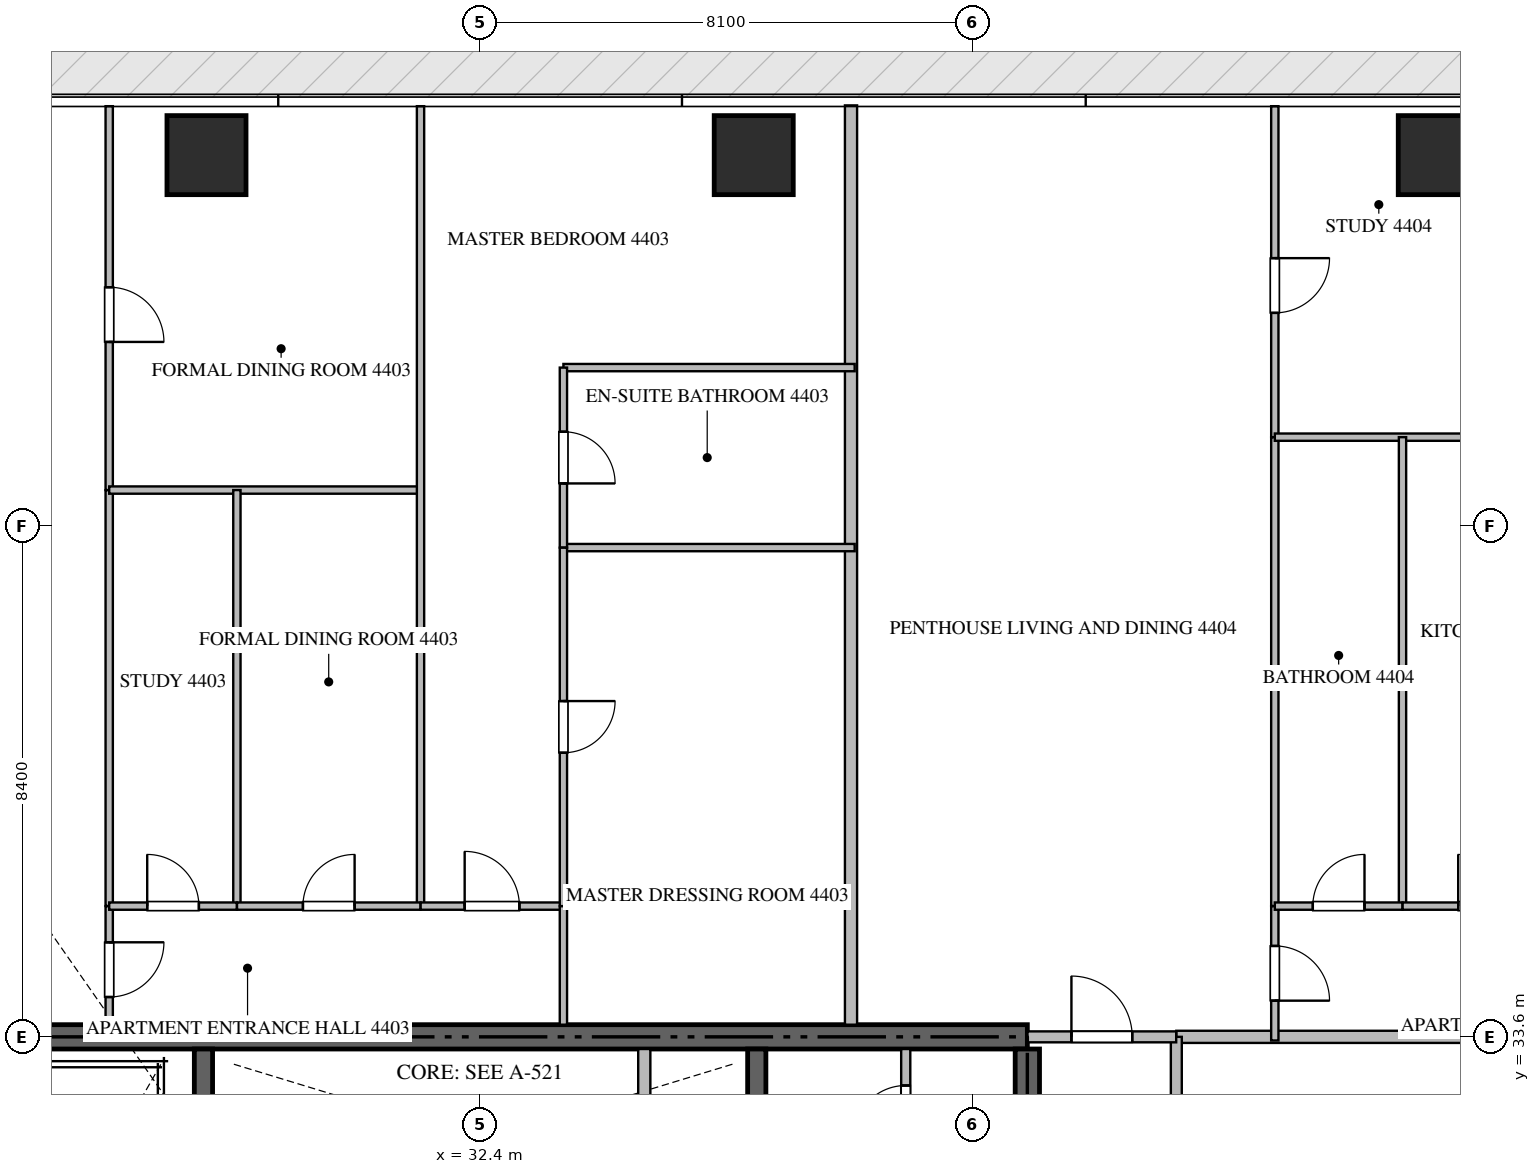
"""IFC4 building model, lengths in metres.
Left out: names, types, materials, properties, quantities, classifications, styles, units other than length and angle.
Written with IfcOpenShell. Run it as: python <this file> out.ifc"""

import sys

from ifc_helpers import new_model, si_unit, direction, frame, frame_2d, origin, origin_2d, place, context, subcontext, project, spatial, rectangle, extrude, source, transform, mapped, element, fill, save


model = new_model("IFC4")
c1 = context("Model", 3, precision=1e-05, world=origin(), true_north=direction((0.0, 1.0)))
c2 = subcontext(c1, "Body", "Model", "MODEL_VIEW")
j1 = project(units=[si_unit("LENGTHUNIT", "METRE"), si_unit("PLANEANGLEUNIT", "RADIAN")], contexts=[c1])
p1 = place(None, origin())
s1 = spatial("IfcSite", under=j1, at=p1, CompositionType="ELEMENT")
p2 = place(p1, origin())
s2 = spatial("IfcBuilding", under=s1, at=p2, CompositionType="ELEMENT")
p3 = place(p2, frame((0.0, 0.0, 176.4)))
s3 = spatial("IfcBuildingStorey", under=s2, at=p3, CompositionType="ELEMENT", Elevation=176.4)
p4 = place(p3, frame((41.4, 33.6, -0.26), z_axis=(0.0, 0.0, 1.0), x_axis=(-1.0, 0.0, 0.0)))
e1 = element("IfcWall", 1, at=p4, inside=s3, PredefinedType="SHEAR", context=c2, shape_type="SweptSolid", body=[
    extrude(rectangle(XDim=18.0, YDim=0.4, at=frame_2d((9.0, 0.0))), origin(), (0.0, 0.0, 1.0), 3.748),
])
p5 = place(p3, frame((41.4, 27.75, -0.26), z_axis=(0.0, 0.0, 1.0), x_axis=(0.0, 1.0, 0.0)))
e2 = element("IfcWall", 2, at=p5, inside=s3, PredefinedType="SHEAR", context=c2, shape_type="SweptSolid", body=[
    extrude(rectangle(XDim=5.65, YDim=0.4, at=frame_2d((2.825, 0.0))), origin(), (0.0, 0.0, 1.0), 3.748),
])
p6 = place(p3, frame((27.85, 23.55, -0.26), z_axis=(0.0, 0.0, 1.0), x_axis=(0.0, 1.0, 0.0)))
e3 = element("IfcWall", 3, at=p6, inside=s3, PredefinedType="SHEAR", context=c2, shape_type="SweptSolid", body=[
    extrude(rectangle(XDim=9.85, YDim=0.3, at=frame_2d((4.925, 0.0))), origin(), (0.0, 0.0, 1.0), 3.748),
])
p7 = place(p3, frame((36.95, 27.05, -0.26), z_axis=(0.0, 0.0, 1.0), x_axis=(0.0, 1.0, 0.0)))
e4 = element("IfcWall", 4, at=p7, inside=s3, PredefinedType="SHEAR", context=c2, shape_type="SweptSolid", body=[
    extrude(rectangle(XDim=6.35, YDim=0.3, at=frame_2d((3.175, 0.0))), origin(), (0.0, 0.0, 1.0), 3.748),
])
m1 = source(origin(), c2, "Body", "SweptSolid", [
    extrude(rectangle(XDim=1.3, YDim=1.3, at=origin_2d()), origin(), (0.0, 0.0, 1.0), 3.75),
])
for number, where, z_axis, x_axis in (
    (5, (27.9, 48.1, -0.26), (0.0, 0.0, 1.0), (1.0, 0.0, 0.0)),
    (6, (36.9, 48.1, -0.26), (0.0, 0.0, 1.0), (1.0, 0.0, 0.0)),
    (7, (48.15, 48.1, -0.26), (0.0, 0.0, 1.0), (1.0, 0.0, 0.0)),
):
    element("IfcColumn", number, at=place(p3, frame(where, z_axis=z_axis, x_axis=x_axis)), inside=s3, PredefinedType="COLUMN", context=c2, shape_type="MappedRepresentation", body=[
        mapped(m1, transform((0.0, 0.0, 0.0), scale=1.0)),
    ])
p8 = place(p3, frame((35.1, 30.75, 0.0), z_axis=(0.0, 0.0, 1.0), x_axis=(0.0, 1.0, 0.0)))
e8 = element("IfcWall", 8, at=p8, inside=s3, PredefinedType="STANDARD", context=c2, shape_type="SweptSolid", body=[
    extrude(rectangle(XDim=2.65, YDim=0.2, at=frame_2d((1.325, 0.0))), origin(), (0.0, 0.0, 1.0), 3.49),
])
p9 = place(p3, frame((39.4, 31.35, 0.0), z_axis=(0.0, 0.0, 1.0), x_axis=(0.0, 1.0, 0.0)))
e9 = element("IfcWall", 9, at=p9, inside=s3, PredefinedType="PARTITIONING", context=c2, shape_type="SweptSolid", body=[
    extrude(rectangle(XDim=2.05, YDim=0.15, at=frame_2d((1.025, 0.0))), origin(), (0.0, 0.0, 1.0), 3.49),
])
p10 = place(p9, frame((0.6, 0.0, 0.0)))
e10 = element("IfcOpeningElement", 10, at=p10, cuts=e9, PredefinedType="OPENING", context=c2, shape_type="SweptSolid", body=[
    extrude(rectangle(XDim=0.85, YDim=2.1, at=frame_2d((0.425, 1.05))), frame((0.0, 0.085, 0.0), z_axis=(0.0, -1.0, 0.0), x_axis=(1.0, 0.0, 0.0)), (0.0, 0.0, 1.0), 0.17),
])
p11 = place(p3, frame((38.5, 33.8, 0.0), z_axis=(0.0, 0.0, 1.0), x_axis=(0.0, 1.0, 0.0)))
e11 = element("IfcWall", 11, at=p11, inside=s3, PredefinedType="PARTITIONING", context=c2, shape_type="SweptSolid", body=[
    extrude(rectangle(XDim=15.118, YDim=0.2, at=frame_2d((7.559, 0.0))), origin(), (0.0, 0.0, 1.0), 3.49),
])
p12 = place(p3, frame((43.85, 33.6, 0.0), z_axis=(0.0, 0.0, 1.0), x_axis=(1.0, 0.0, 0.0)))
e12 = element("IfcWall", 12, at=p12, inside=s3, PredefinedType="PARTITIONING", context=c2, shape_type="SweptSolid", body=[
    extrude(rectangle(XDim=13.068, YDim=0.2, at=frame_2d((6.534, 0.0))), origin(), (0.0, 0.0, 1.0), 3.49),
])
p13 = place(p3, frame((43.85, 14.9, 0.0), z_axis=(0.0, 0.0, 1.0), x_axis=(0.0, 1.0, 0.0)))
e13 = element("IfcWall", 13, at=p13, inside=s3, PredefinedType="PARTITIONING", context=c2, shape_type="SweptSolid", body=[
    extrude(rectangle(XDim=18.7, YDim=0.18, at=frame_2d((9.35, 0.0))), origin(), (0.0, 0.0, 1.0), 3.49),
])
p14 = place(p13, frame((1.805, 0.0, 0.0)))
e14 = element("IfcOpeningElement", 14, at=p14, cuts=e13, PredefinedType="OPENING", context=c2, shape_type="SweptSolid", body=[
    extrude(rectangle(XDim=1.0, YDim=2.15, at=frame_2d((0.5, 1.075))), frame((0.0, 0.1, 0.0), z_axis=(0.0, -1.0, 0.0), x_axis=(1.0, 0.0, 0.0)), (0.0, 0.0, 1.0), 0.2),
])
p15 = place(p3, frame((41.402, 33.6, 0.0), z_axis=(0.0, 0.0, 1.0), x_axis=(1.0, 0.0, 0.0)))
e15 = element("IfcWall", 15, at=p15, inside=s3, PredefinedType="PARTITIONING", context=c2, shape_type="SweptSolid", body=[
    extrude(rectangle(XDim=2.446, YDim=0.18, at=frame_2d((1.223, 0.0))), origin(), (0.0, 0.0, 1.0), 3.49),
])
p16 = place(p15, frame((0.723, 0.0, 0.0)))
e16 = element("IfcOpeningElement", 16, at=p16, cuts=e15, PredefinedType="OPENING", context=c2, shape_type="SweptSolid", body=[
    extrude(rectangle(XDim=1.0, YDim=2.15, at=frame_2d((0.5, 1.075))), frame((0.0, 0.1, 0.0), z_axis=(0.0, -1.0, 0.0), x_axis=(1.0, 0.0, 0.0)), (0.0, 0.0, 1.0), 0.2),
])
p17 = place(p3, frame((26.3, 35.75, 0.0), z_axis=(0.0, 0.0, 1.0), x_axis=(0.0, -1.0, 0.0)))
e17 = element("IfcWall", 17, at=p17, inside=s3, PredefinedType="PARTITIONING", context=c2, shape_type="SweptSolid", body=[
    extrude(rectangle(XDim=1.95, YDim=0.12, at=frame_2d((0.975, 0.0))), origin(), (0.0, 0.0, 1.0), 3.49),
])
p18 = place(p17, frame((0.595, 0.0, 0.0)))
e18 = element("IfcOpeningElement", 18, at=p18, cuts=e17, PredefinedType="OPENING", context=c2, shape_type="SweptSolid", body=[
    extrude(rectangle(XDim=0.9, YDim=2.1, at=frame_2d((0.45, 1.05))), frame((0.0, 0.07, 0.0), z_axis=(0.0, -1.0, 0.0), x_axis=(1.0, 0.0, 0.0)), (0.0, 0.0, 1.0), 0.14),
])
p19 = place(p3, frame((26.3, 48.905, 0.0), z_axis=(0.0, 0.0, 1.0), x_axis=(0.0, -1.0, 0.0)))
e19 = element("IfcWall", 19, at=p19, inside=s3, PredefinedType="PARTITIONING", context=c2, shape_type="SweptSolid", body=[
    extrude(rectangle(XDim=6.313, YDim=0.12, at=frame_2d((3.156, 0.0))), origin(), (0.0, 0.0, 1.0), 3.49),
])
p20 = place(p19, frame((2.977, 0.0, 0.0)))
e20 = element("IfcOpeningElement", 20, at=p20, cuts=e19, PredefinedType="OPENING", context=c2, shape_type="SweptSolid", body=[
    extrude(rectangle(XDim=0.9, YDim=2.1, at=frame_2d((0.45, 1.05))), frame((0.0, 0.07, 0.0), z_axis=(0.0, -1.0, 0.0), x_axis=(1.0, 0.0, 0.0)), (0.0, 0.0, 1.0), 0.14),
])
p21 = place(p3, frame((26.3, 42.59, 0.0), z_axis=(0.0, 0.0, 1.0), x_axis=(0.0, -1.0, 0.0)))
e21 = element("IfcWall", 21, at=p21, inside=s3, PredefinedType="PARTITIONING", context=c2, shape_type="SweptSolid", body=[
    extrude(rectangle(XDim=6.838, YDim=0.12, at=frame_2d((3.419, 0.0))), origin(), (0.0, 0.0, 1.0), 3.49),
])
p22 = place(p3, frame((26.3, 42.592, 0.0), z_axis=(0.0, 0.0, 1.0), x_axis=(1.0, 0.0, 0.0)))
e22 = element("IfcWall", 22, at=p22, inside=s3, PredefinedType="PARTITIONING", context=c2, shape_type="SweptSolid", body=[
    extrude(rectangle(XDim=5.12, YDim=0.12, at=frame_2d((2.56, 0.0))), origin(), (0.0, 0.0, 1.0), 3.49),
])
p23 = place(p3, frame((31.42, 48.905, 0.0), z_axis=(0.0, 0.0, 1.0), x_axis=(0.0, -1.0, 0.0)))
e23 = element("IfcWall", 23, at=p23, inside=s3, PredefinedType="PARTITIONING", context=c2, shape_type="SweptSolid", body=[
    extrude(rectangle(XDim=13.155, YDim=0.12, at=frame_2d((6.578, 0.0))), origin(), (0.0, 0.0, 1.0), 3.49),
])
p24 = place(p3, frame((28.4, 42.592, 0.0), z_axis=(0.0, 0.0, 1.0), x_axis=(0.0, -1.0, 0.0)))
e24 = element("IfcWall", 24, at=p24, inside=s3, PredefinedType="PARTITIONING", context=c2, shape_type="SweptSolid", body=[
    extrude(rectangle(XDim=6.842, YDim=0.12, at=frame_2d((3.421, 0.0))), origin(), (0.0, 0.0, 1.0), 3.49),
])
p25 = place(p3, frame((26.3, 35.75, 0.0), z_axis=(0.0, 0.0, 1.0), x_axis=(1.0, 0.0, 0.0)))
e25 = element("IfcWall", 25, at=p25, inside=s3, PredefinedType="PARTITIONING", context=c2, shape_type="SweptSolid", body=[
    extrude(rectangle(XDim=2.1, YDim=0.12, at=frame_2d((1.05, 0.0))), origin(), (0.0, 0.0, 1.0), 3.49),
])
p26 = place(p25, frame((0.625, 0.0, 0.0)))
e26 = element("IfcOpeningElement", 26, at=p26, cuts=e25, PredefinedType="OPENING", context=c2, shape_type="SweptSolid", body=[
    extrude(rectangle(XDim=0.85, YDim=2.1, at=frame_2d((0.425, 1.05))), frame((0.0, 0.07, 0.0), z_axis=(0.0, -1.0, 0.0), x_axis=(1.0, 0.0, 0.0)), (0.0, 0.0, 1.0), 0.14),
])
p27 = place(p3, frame((28.402, 35.75, 0.0), z_axis=(0.0, 0.0, 1.0), x_axis=(1.0, 0.0, 0.0)))
e27 = element("IfcWall", 27, at=p27, inside=s3, PredefinedType="PARTITIONING", context=c2, shape_type="SweptSolid", body=[
    extrude(rectangle(XDim=3.018, YDim=0.12, at=frame_2d((1.509, 0.0))), origin(), (0.0, 0.0, 1.0), 3.49),
])
p28 = place(p27, frame((1.084, 0.0, 0.0)))
e28 = element("IfcOpeningElement", 28, at=p28, cuts=e27, PredefinedType="OPENING", context=c2, shape_type="SweptSolid", body=[
    extrude(rectangle(XDim=0.85, YDim=2.1, at=frame_2d((0.425, 1.05))), frame((0.0, 0.07, 0.0), z_axis=(0.0, -1.0, 0.0), x_axis=(1.0, 0.0, 0.0)), (0.0, 0.0, 1.0), 0.14),
])
p29 = place(p3, frame((31.422, 35.75, 0.0), z_axis=(0.0, 0.0, 1.0), x_axis=(1.0, 0.0, 0.0)))
e29 = element("IfcWall", 29, at=p29, inside=s3, PredefinedType="PARTITIONING", context=c2, shape_type="SweptSolid", body=[
    extrude(rectangle(XDim=2.348, YDim=0.12, at=frame_2d((1.174, 0.0))), origin(), (0.0, 0.0, 1.0), 3.49),
])
p30 = place(p29, frame((0.724, 0.0, 0.0)))
e30 = element("IfcOpeningElement", 30, at=p30, cuts=e29, PredefinedType="OPENING", context=c2, shape_type="SweptSolid", body=[
    extrude(rectangle(XDim=0.9, YDim=2.1, at=frame_2d((0.45, 1.05))), frame((0.0, 0.07, 0.0), z_axis=(0.0, -1.0, 0.0), x_axis=(1.0, 0.0, 0.0)), (0.0, 0.0, 1.0), 0.14),
])
for number, where, z_axis, x_axis in (
    (31, (33.77, 44.606, 0.0), (0.0, 0.0, 1.0), (1.0, 0.0, 0.0)),
    (32, (33.77, 41.646, 0.0), (0.0, 0.0, 1.0), (1.0, 0.0, 0.0)),
):
    element("IfcWall", number, at=place(p3, frame(where, z_axis=z_axis, x_axis=x_axis)), inside=s3, PredefinedType="PARTITIONING", context=c2, shape_type="SweptSolid", body=[
        extrude(rectangle(XDim=4.79, YDim=0.12, at=frame_2d((2.395, 0.0))), origin(), (0.0, 0.0, 1.0), 3.49),
    ])
p31 = place(p3, frame((33.77, 44.606, 0.0), z_axis=(0.0, 0.0, 1.0), x_axis=(0.0, -1.0, 0.0)))
e33 = element("IfcWall", 33, at=p31, inside=s3, PredefinedType="PARTITIONING", context=c2, shape_type="SweptSolid", body=[
    extrude(rectangle(XDim=2.96, YDim=0.12, at=frame_2d((1.48, 0.0))), origin(), (0.0, 0.0, 1.0), 3.49),
])
p32 = place(p31, frame((1.055, 0.0, 0.0)))
e34 = element("IfcOpeningElement", 34, at=p32, cuts=e33, PredefinedType="OPENING", context=c2, shape_type="SweptSolid", body=[
    extrude(rectangle(XDim=0.85, YDim=2.1, at=frame_2d((0.425, 1.05))), frame((0.0, 0.07, 0.0), z_axis=(0.0, -1.0, 0.0), x_axis=(1.0, 0.0, 0.0)), (0.0, 0.0, 1.0), 0.14),
])
p33 = place(p3, frame((33.77, 41.644, 0.0), z_axis=(0.0, 0.0, 1.0), x_axis=(0.0, -1.0, 0.0)))
e35 = element("IfcWall", 35, at=p33, inside=s3, PredefinedType="PARTITIONING", context=c2, shape_type="SweptSolid", body=[
    extrude(rectangle(XDim=5.894, YDim=0.12, at=frame_2d((2.947, 0.0))), origin(), (0.0, 0.0, 1.0), 3.49),
])
p34 = place(p33, frame((2.522, 0.0, 0.0)))
e36 = element("IfcOpeningElement", 36, at=p34, cuts=e35, PredefinedType="OPENING", context=c2, shape_type="SweptSolid", body=[
    extrude(rectangle(XDim=0.85, YDim=2.1, at=frame_2d((0.425, 1.05))), frame((0.0, 0.07, 0.0), z_axis=(0.0, -1.0, 0.0), x_axis=(1.0, 0.0, 0.0)), (0.0, 0.0, 1.0), 0.14),
])
p35 = place(p3, frame((33.77, 35.748, 0.0), z_axis=(0.0, 0.0, 1.0), x_axis=(0.0, -1.0, 0.0)))
e37 = element("IfcWall", 37, at=p35, inside=s3, PredefinedType="PARTITIONING", context=c2, shape_type="SweptSolid", body=[
    extrude(rectangle(XDim=1.948, YDim=0.12, at=frame_2d((0.974, 0.0))), origin(), (0.0, 0.0, 1.0), 3.49),
])
p36 = place(p3, frame((45.47, 35.75, 0.0), z_axis=(0.0, 0.0, 1.0), x_axis=(0.0, -1.0, 0.0)))
e38 = element("IfcWall", 38, at=p36, inside=s3, PredefinedType="PARTITIONING", context=c2, shape_type="SweptSolid", body=[
    extrude(rectangle(XDim=2.21, YDim=0.12, at=frame_2d((1.105, 0.0))), origin(), (0.0, 0.0, 1.0), 3.49),
])
p37 = place(p36, frame((0.655, 0.0, 0.0)))
e39 = element("IfcOpeningElement", 39, at=p37, cuts=e38, PredefinedType="OPENING", context=c2, shape_type="SweptSolid", body=[
    extrude(rectangle(XDim=0.9, YDim=2.1, at=frame_2d((0.45, 1.05))), frame((0.0, 0.07, 0.0), z_axis=(0.0, -1.0, 0.0), x_axis=(1.0, 0.0, 0.0)), (0.0, 0.0, 1.0), 0.14),
])
p38 = place(p3, frame((45.47, 48.905, 0.0), z_axis=(0.0, 0.0, 1.0), x_axis=(0.0, -1.0, 0.0)))
e40 = element("IfcWall", 40, at=p38, inside=s3, PredefinedType="PARTITIONING", context=c2, shape_type="SweptSolid", body=[
    extrude(rectangle(XDim=5.443, YDim=0.12, at=frame_2d((2.722, 0.0))), origin(), (0.0, 0.0, 1.0), 3.49),
])
p39 = place(p38, frame((2.499, 0.0, 0.0)))
e41 = element("IfcOpeningElement", 41, at=p39, cuts=e40, PredefinedType="OPENING", context=c2, shape_type="SweptSolid", body=[
    extrude(rectangle(XDim=0.9, YDim=2.1, at=frame_2d((0.45, 1.05))), frame((0.0, 0.07, 0.0), z_axis=(0.0, -1.0, 0.0), x_axis=(1.0, 0.0, 0.0)), (0.0, 0.0, 1.0), 0.14),
])
p40 = place(p3, frame((45.47, 43.46, 0.0), z_axis=(0.0, 0.0, 1.0), x_axis=(0.0, -1.0, 0.0)))
e42 = element("IfcWall", 42, at=p40, inside=s3, PredefinedType="PARTITIONING", context=c2, shape_type="SweptSolid", body=[
    extrude(rectangle(XDim=7.708, YDim=0.12, at=frame_2d((3.854, 0.0))), origin(), (0.0, 0.0, 1.0), 3.49),
])
p41 = place(p3, frame((45.47, 43.462, 0.0), z_axis=(0.0, 0.0, 1.0), x_axis=(1.0, 0.0, 0.0)))
e43 = element("IfcWall", 43, at=p41, inside=s3, PredefinedType="PARTITIONING", context=c2, shape_type="SweptSolid", body=[
    extrude(rectangle(XDim=4.78, YDim=0.12, at=frame_2d((2.39, 0.0))), origin(), (0.0, 0.0, 1.0), 3.49),
])
p42 = place(p3, frame((47.57, 43.462, 0.0), z_axis=(0.0, 0.0, 1.0), x_axis=(0.0, -1.0, 0.0)))
e44 = element("IfcWall", 44, at=p42, inside=s3, PredefinedType="PARTITIONING", context=c2, shape_type="SweptSolid", body=[
    extrude(rectangle(XDim=7.712, YDim=0.12, at=frame_2d((3.856, 0.0))), origin(), (0.0, 0.0, 1.0), 3.49),
])
p43 = place(p3, frame((45.47, 35.75, 0.0), z_axis=(0.0, 0.0, 1.0), x_axis=(1.0, 0.0, 0.0)))
e45 = element("IfcWall", 45, at=p43, inside=s3, PredefinedType="PARTITIONING", context=c2, shape_type="SweptSolid", body=[
    extrude(rectangle(XDim=2.1, YDim=0.12, at=frame_2d((1.05, 0.0))), origin(), (0.0, 0.0, 1.0), 3.49),
])
p44 = place(p43, frame((0.625, 0.0, 0.0)))
e46 = element("IfcOpeningElement", 46, at=p44, cuts=e45, PredefinedType="OPENING", context=c2, shape_type="SweptSolid", body=[
    extrude(rectangle(XDim=0.85, YDim=2.1, at=frame_2d((0.425, 1.05))), frame((0.0, 0.07, 0.0), z_axis=(0.0, -1.0, 0.0), x_axis=(1.0, 0.0, 0.0)), (0.0, 0.0, 1.0), 0.14),
])
p45 = place(p3, frame((47.572, 35.75, 0.0), z_axis=(0.0, 0.0, 1.0), x_axis=(1.0, 0.0, 0.0)))
e47 = element("IfcWall", 47, at=p45, inside=s3, PredefinedType="PARTITIONING", context=c2, shape_type="SweptSolid", body=[
    extrude(rectangle(XDim=2.678, YDim=0.12, at=frame_2d((1.339, 0.0))), origin(), (0.0, 0.0, 1.0), 3.49),
])
p46 = place(p45, frame((0.914, 0.0, 0.0)))
e48 = element("IfcOpeningElement", 48, at=p46, cuts=e47, PredefinedType="OPENING", context=c2, shape_type="SweptSolid", body=[
    extrude(rectangle(XDim=0.85, YDim=2.1, at=frame_2d((0.425, 1.05))), frame((0.0, 0.07, 0.0), z_axis=(0.0, -1.0, 0.0), x_axis=(1.0, 0.0, 0.0)), (0.0, 0.0, 1.0), 0.14),
])
m2 = source(origin(), c2, "Body", "SweptSolid", [
    extrude(rectangle(XDim=0.85, YDim=2.1, at=frame_2d((0.425, 1.05))), frame((0.0, 0.025, 0.0), z_axis=(0.0, -1.0, 0.0), x_axis=(1.0, 0.0, 0.0)), (0.0, 0.0, 1.0), 0.05),
])
p47 = place(p10, origin())
e49 = element("IfcDoor", 49, at=p47, inside=s3, OperationType="SINGLE_SWING_LEFT", PredefinedType="DOOR", context=c2, shape_type="MappedRepresentation", body=[
    mapped(m2, transform((0.0, 0.0, 0.0), scale=1.0)),
])
fill(e10, e49)
m3 = source(origin(), c2, "Body", "SweptSolid", [
    extrude(rectangle(XDim=1.0, YDim=2.15, at=frame_2d((0.5, 1.075))), frame((0.0, 0.025, 0.0), z_axis=(0.0, -1.0, 0.0), x_axis=(1.0, 0.0, 0.0)), (0.0, 0.0, 1.0), 0.05),
])
p48 = place(p16, origin())
e50 = element("IfcDoor", 50, at=p48, inside=s3, OperationType="SINGLE_SWING_LEFT", PredefinedType="DOOR", context=c2, shape_type="MappedRepresentation", body=[
    mapped(m3, transform((0.0, 0.0, 0.0), scale=1.0)),
])
fill(e16, e50)
m4 = source(origin(), c2, "Body", "SweptSolid", [
    extrude(rectangle(XDim=0.9, YDim=2.1, at=frame_2d((0.45, 1.05))), frame((0.0, 0.025, 0.0), z_axis=(0.0, -1.0, 0.0), x_axis=(1.0, 0.0, 0.0)), (0.0, 0.0, 1.0), 0.05),
])
p49 = place(p18, origin())
e51 = element("IfcDoor", 51, at=p49, inside=s3, OperationType="SINGLE_SWING_LEFT", PredefinedType="DOOR", context=c2, shape_type="MappedRepresentation", body=[
    mapped(m4, transform((0.0, 0.0, 0.0), scale=1.0)),
])
fill(e18, e51)
p50 = place(p20, origin())
e52 = element("IfcDoor", 52, at=p50, inside=s3, OperationType="SINGLE_SWING_RIGHT", PredefinedType="DOOR", context=c2, shape_type="MappedRepresentation", body=[
    mapped(m4, transform((0.0, 0.0, 0.0), scale=1.0)),
])
fill(e20, e52)
p51 = place(p26, origin())
e53 = element("IfcDoor", 53, at=p51, inside=s3, OperationType="SINGLE_SWING_LEFT", PredefinedType="DOOR", context=c2, shape_type="MappedRepresentation", body=[
    mapped(m2, transform((0.0, 0.0, 0.0), scale=1.0)),
])
fill(e26, e53)
p52 = place(p28, origin())
e54 = element("IfcDoor", 54, at=p52, inside=s3, OperationType="SINGLE_SWING_RIGHT", PredefinedType="DOOR", context=c2, shape_type="MappedRepresentation", body=[
    mapped(m2, transform((0.0, 0.0, 0.0), scale=1.0)),
])
fill(e28, e54)
p53 = place(p30, origin())
e55 = element("IfcDoor", 55, at=p53, inside=s3, OperationType="SINGLE_SWING_LEFT", PredefinedType="DOOR", context=c2, shape_type="MappedRepresentation", body=[
    mapped(m4, transform((0.0, 0.0, 0.0), scale=1.0)),
])
fill(e30, e55)
p54 = place(p32, origin())
e56 = element("IfcDoor", 56, at=p54, inside=s3, OperationType="SINGLE_SWING_RIGHT", PredefinedType="DOOR", context=c2, shape_type="MappedRepresentation", body=[
    mapped(m2, transform((0.0, 0.0, 0.0), scale=1.0)),
])
fill(e34, e56)
p55 = place(p34, origin())
e57 = element("IfcDoor", 57, at=p55, inside=s3, OperationType="SINGLE_SWING_LEFT", PredefinedType="DOOR", context=c2, shape_type="MappedRepresentation", body=[
    mapped(m2, transform((0.0, 0.0, 0.0), scale=1.0)),
])
fill(e36, e57)
p56 = place(p37, origin())
e58 = element("IfcDoor", 58, at=p56, inside=s3, OperationType="SINGLE_SWING_RIGHT", PredefinedType="DOOR", context=c2, shape_type="MappedRepresentation", body=[
    mapped(m4, transform((0.0, 0.0, 0.0), scale=1.0)),
])
fill(e39, e58)
p57 = place(p39, origin())
e59 = element("IfcDoor", 59, at=p57, inside=s3, OperationType="SINGLE_SWING_LEFT", PredefinedType="DOOR", context=c2, shape_type="MappedRepresentation", body=[
    mapped(m4, transform((0.0, 0.0, 0.0), scale=1.0)),
])
fill(e41, e59)
p58 = place(p44, origin())
e60 = element("IfcDoor", 60, at=p58, inside=s3, OperationType="SINGLE_SWING_RIGHT", PredefinedType="DOOR", context=c2, shape_type="MappedRepresentation", body=[
    mapped(m2, transform((0.0, 0.0, 0.0), scale=1.0)),
])
fill(e46, e60)
p59 = place(p46, origin())
e61 = element("IfcDoor", 61, at=p59, inside=s3, OperationType="SINGLE_SWING_LEFT", PredefinedType="DOOR", context=c2, shape_type="MappedRepresentation", body=[
    mapped(m2, transform((0.0, 0.0, 0.0), scale=1.0)),
])
fill(e48, e61)
save(model, sys.argv[1])
